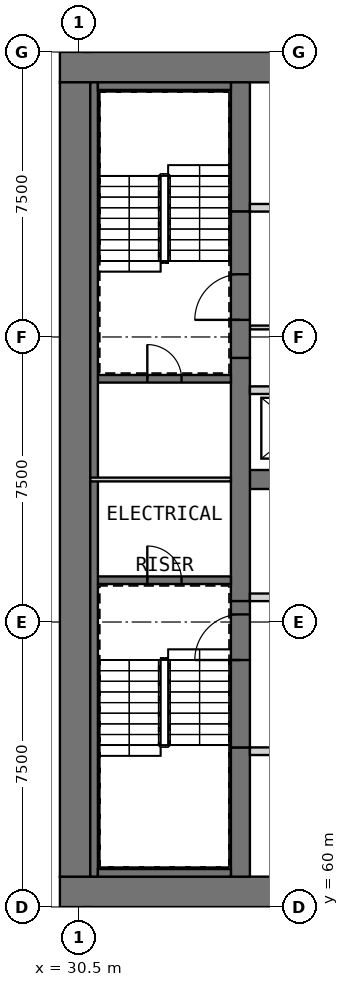
"""IFC4 building model, lengths in metres.
Left out: names, types, materials, properties, quantities, classifications, styles, units other than length and angle.
Written with IfcOpenShell. Run it as: python <this file> out.ifc"""

import sys

from ifc_helpers import new_model, si_unit, direction, frame, frame_2d, origin, place, context, subcontext, project, spatial, rectangle, extrude, element, fill, save


model = new_model("IFC4")
c1 = context("Model", 3, precision=1e-05, world=origin(), true_north=direction((0.0, 1.0)))
c2 = subcontext(c1, "Body", "Model", "MODEL_VIEW")
j1 = project(units=[si_unit("LENGTHUNIT", "METRE"), si_unit("PLANEANGLEUNIT", "RADIAN")], contexts=[c1])
p1 = place(None, origin())
s1 = spatial("IfcSite", under=j1, at=p1, CompositionType="ELEMENT")
p2 = place(p1, origin())
s2 = spatial("IfcBuilding", under=s1, at=p2, CompositionType="ELEMENT")
p3 = place(p2, frame((0.0, 0.0, 124.2)))
s3 = spatial("IfcBuildingStorey", under=s2, at=p3, CompositionType="ELEMENT", Elevation=124.2)
p4 = place(p3, frame((30.0, 60.4, 0.0), z_axis=(0.0, 0.0, 1.0), x_axis=(1.0, 0.0, 0.0)))
e1 = element("IfcWall", 1, at=p4, inside=s3, PredefinedType="SHEAR", context=c2, shape_type="SweptSolid", body=[
    extrude(rectangle(XDim=30.0, YDim=0.8, at=frame_2d((15.0, 0.0))), origin(), (0.0, 0.0, 1.0), 6.0),
])
p5 = place(p4, frame((21.9, 0.0, 0.0)))
e2 = element("IfcOpeningElement", 2, at=p5, cuts=e1, PredefinedType="OPENING", context=c2, shape_type="SweptSolid", body=[
    extrude(rectangle(XDim=1.8, YDim=2.1, at=frame_2d((0.9, 1.05))), frame((0.0, 0.41, 0.0), z_axis=(0.0, -1.0, 0.0), x_axis=(1.0, 0.0, 0.0)), (0.0, 0.0, 1.0), 0.82),
])
p6 = place(p4, frame((26.5, 0.0, 0.0)))
e3 = element("IfcOpeningElement", 3, at=p6, cuts=e1, PredefinedType="OPENING", context=c2, shape_type="SweptSolid", body=[
    extrude(rectangle(XDim=1.2, YDim=2.1, at=frame_2d((0.6, 1.05))), frame((0.0, 0.41, 0.0), z_axis=(0.0, -1.0, 0.0), x_axis=(1.0, 0.0, 0.0)), (0.0, 0.0, 1.0), 0.82),
])
p7 = place(p3, frame((30.0, 82.1, 0.0), z_axis=(0.0, 0.0, 1.0), x_axis=(1.0, 0.0, 0.0)))
e4 = element("IfcWall", 4, at=p7, inside=s3, PredefinedType="SHEAR", context=c2, shape_type="SweptSolid", body=[
    extrude(rectangle(XDim=30.0, YDim=0.8, at=frame_2d((15.0, 0.0))), origin(), (0.0, 0.0, 1.0), 6.0),
])
p8 = place(p3, frame((30.4, 60.8, 0.0), z_axis=(0.0, 0.0, 1.0), x_axis=(0.0, 1.0, 0.0)))
e5 = element("IfcWall", 5, at=p8, inside=s3, PredefinedType="SHEAR", context=c2, shape_type="SweptSolid", body=[
    extrude(rectangle(XDim=20.9, YDim=0.8, at=frame_2d((10.45, 0.0))), origin(), (0.0, 0.0, 1.0), 6.0),
])
p9 = place(p3, frame((35.0, 71.25, 0.0), z_axis=(0.0, 0.0, 1.0), x_axis=(1.0, 0.0, 0.0)))
e6 = element("IfcWall", 6, at=p9, inside=s3, PredefinedType="SHEAR", context=c2, shape_type="SweptSolid", body=[
    extrude(rectangle(XDim=15.6, YDim=0.5, at=frame_2d((7.8, 0.0))), origin(), (0.0, 0.0, 1.0), 6.0),
])
p10 = place(p3, frame((34.75, 60.8, 0.0), z_axis=(0.0, 0.0, 1.0), x_axis=(0.0, 1.0, 0.0)))
e7 = element("IfcWall", 7, at=p10, inside=s3, PredefinedType="SHEAR", context=c2, shape_type="SweptSolid", body=[
    extrude(rectangle(XDim=3.4, YDim=0.5, at=frame_2d((1.7, 0.0))), origin(), (0.0, 0.0, 1.0), 6.0),
])
p11 = place(p3, frame((34.75, 68.05, 0.0), z_axis=(0.0, 0.0, 1.0), x_axis=(0.0, 1.0, 0.0)))
e8 = element("IfcWall", 8, at=p11, inside=s3, PredefinedType="SHEAR", context=c2, shape_type="SweptSolid", body=[
    extrude(rectangle(XDim=6.4, YDim=0.5, at=frame_2d((3.2, 0.0))), origin(), (0.0, 0.0, 1.0), 6.0),
])
p12 = place(p3, frame((34.75, 78.3, 0.0), z_axis=(0.0, 0.0, 1.0), x_axis=(0.0, 1.0, 0.0)))
e9 = element("IfcWall", 9, at=p12, inside=s3, PredefinedType="SHEAR", context=c2, shape_type="SweptSolid", body=[
    extrude(rectangle(XDim=3.4, YDim=0.5, at=frame_2d((1.7, 0.0))), origin(), (0.0, 0.0, 1.0), 6.0),
])
p13 = place(p2, frame((0.0, 0.0, 34.0)))
s4 = spatial("IfcBuildingStorey", under=s2, at=p13, CompositionType="ELEMENT", Elevation=34.0)
for number, where, z_axis, x_axis in (
    (10, (29.7, 61.05, 0.0), (0.0, 0.0, 1.0), (0.0, 1.0, 0.0)),
    (11, (29.7, 65.925, 0.0), (0.0, 0.0, 1.0), (0.0, 1.0, 0.0)),
    (12, (29.7, 70.8, 0.0), (0.0, 0.0, 1.0), (0.0, 1.0, 0.0)),
    (13, (29.7, 75.675, 0.0), (0.0, 0.0, 1.0), (0.0, 1.0, 0.0)),
    (14, (29.7, 80.55, 0.0), (0.0, 0.0, 1.0), (0.0, 1.0, 0.0)),
):
    element("IfcWall", number, at=place(p13, frame(where, z_axis=z_axis, x_axis=x_axis)), inside=s4, PredefinedType="SOLIDWALL", context=c2, shape_type="SweptSolid", body=[
        extrude(rectangle(XDim=0.9, YDim=0.6, at=frame_2d((0.45, 0.0))), origin(), (0.0, 0.0, 1.0), 286.2),
    ])
p14 = place(p3, frame((35.0, 64.1, 0.0), z_axis=(0.0, 0.0, 1.0), x_axis=(1.0, 0.0, 0.0)))
e15 = element("IfcWall", 15, at=p14, inside=s3, PredefinedType="SOLIDWALL", context=c2, shape_type="SweptSolid", body=[
    extrude(rectangle(XDim=13.0, YDim=0.2, at=frame_2d((6.5, 0.0))), origin(), (0.0, 0.0, 1.0), 6.0),
])
p15 = place(p14, frame((0.75, 0.0, 0.0)))
e16 = element("IfcOpeningElement", 16, at=p15, cuts=e15, PredefinedType="OPENING", context=c2, shape_type="SweptSolid", body=[
    extrude(rectangle(XDim=1.1, YDim=2.1, at=frame_2d((0.55, 1.05))), frame((0.0, 0.11, 0.0), z_axis=(0.0, -1.0, 0.0), x_axis=(1.0, 0.0, 0.0)), (0.0, 0.0, 1.0), 0.22),
])
p16 = place(p14, frame((3.35, 0.0, 0.0)))
e17 = element("IfcOpeningElement", 17, at=p16, cuts=e15, PredefinedType="OPENING", context=c2, shape_type="SweptSolid", body=[
    extrude(rectangle(XDim=1.1, YDim=2.1, at=frame_2d((0.55, 1.05))), frame((0.0, 0.11, 0.0), z_axis=(0.0, -1.0, 0.0), x_axis=(1.0, 0.0, 0.0)), (0.0, 0.0, 1.0), 0.22),
])
p17 = place(p14, frame((5.95, 0.0, 0.0)))
e18 = element("IfcOpeningElement", 18, at=p17, cuts=e15, PredefinedType="OPENING", context=c2, shape_type="SweptSolid", body=[
    extrude(rectangle(XDim=1.1, YDim=2.1, at=frame_2d((0.55, 1.05))), frame((0.0, 0.11, 0.0), z_axis=(0.0, -1.0, 0.0), x_axis=(1.0, 0.0, 0.0)), (0.0, 0.0, 1.0), 0.22),
])
p18 = place(p14, frame((8.55, 0.0, 0.0)))
e19 = element("IfcOpeningElement", 19, at=p18, cuts=e15, PredefinedType="OPENING", context=c2, shape_type="SweptSolid", body=[
    extrude(rectangle(XDim=1.1, YDim=2.1, at=frame_2d((0.55, 1.05))), frame((0.0, 0.11, 0.0), z_axis=(0.0, -1.0, 0.0), x_axis=(1.0, 0.0, 0.0)), (0.0, 0.0, 1.0), 0.22),
])
p19 = place(p14, frame((11.15, 0.0, 0.0)))
e20 = element("IfcOpeningElement", 20, at=p19, cuts=e15, PredefinedType="OPENING", context=c2, shape_type="SweptSolid", body=[
    extrude(rectangle(XDim=1.1, YDim=2.1, at=frame_2d((0.55, 1.05))), frame((0.0, 0.11, 0.0), z_axis=(0.0, -1.0, 0.0), x_axis=(1.0, 0.0, 0.0)), (0.0, 0.0, 1.0), 0.22),
])
p20 = place(p3, frame((35.0, 68.15, 0.0), z_axis=(0.0, 0.0, 1.0), x_axis=(1.0, 0.0, 0.0)))
e21 = element("IfcWall", 21, at=p20, inside=s3, PredefinedType="SOLIDWALL", context=c2, shape_type="SweptSolid", body=[
    extrude(rectangle(XDim=13.0, YDim=0.2, at=frame_2d((6.5, 0.0))), origin(), (0.0, 0.0, 1.0), 6.0),
])
p21 = place(p20, frame((0.75, 0.0, 0.0)))
e22 = element("IfcOpeningElement", 22, at=p21, cuts=e21, PredefinedType="OPENING", context=c2, shape_type="SweptSolid", body=[
    extrude(rectangle(XDim=1.1, YDim=2.1, at=frame_2d((0.55, 1.05))), frame((0.0, 0.11, 0.0), z_axis=(0.0, -1.0, 0.0), x_axis=(1.0, 0.0, 0.0)), (0.0, 0.0, 1.0), 0.22),
])
p22 = place(p20, frame((3.35, 0.0, 0.0)))
e23 = element("IfcOpeningElement", 23, at=p22, cuts=e21, PredefinedType="OPENING", context=c2, shape_type="SweptSolid", body=[
    extrude(rectangle(XDim=1.1, YDim=2.1, at=frame_2d((0.55, 1.05))), frame((0.0, 0.11, 0.0), z_axis=(0.0, -1.0, 0.0), x_axis=(1.0, 0.0, 0.0)), (0.0, 0.0, 1.0), 0.22),
])
p23 = place(p20, frame((5.95, 0.0, 0.0)))
e24 = element("IfcOpeningElement", 24, at=p23, cuts=e21, PredefinedType="OPENING", context=c2, shape_type="SweptSolid", body=[
    extrude(rectangle(XDim=1.1, YDim=2.1, at=frame_2d((0.55, 1.05))), frame((0.0, 0.11, 0.0), z_axis=(0.0, -1.0, 0.0), x_axis=(1.0, 0.0, 0.0)), (0.0, 0.0, 1.0), 0.22),
])
p24 = place(p20, frame((8.55, 0.0, 0.0)))
e25 = element("IfcOpeningElement", 25, at=p24, cuts=e21, PredefinedType="OPENING", context=c2, shape_type="SweptSolid", body=[
    extrude(rectangle(XDim=1.1, YDim=2.1, at=frame_2d((0.55, 1.05))), frame((0.0, 0.11, 0.0), z_axis=(0.0, -1.0, 0.0), x_axis=(1.0, 0.0, 0.0)), (0.0, 0.0, 1.0), 0.22),
])
p25 = place(p20, frame((11.15, 0.0, 0.0)))
e26 = element("IfcOpeningElement", 26, at=p25, cuts=e21, PredefinedType="OPENING", context=c2, shape_type="SweptSolid", body=[
    extrude(rectangle(XDim=1.1, YDim=2.1, at=frame_2d((0.55, 1.05))), frame((0.0, 0.11, 0.0), z_axis=(0.0, -1.0, 0.0), x_axis=(1.0, 0.0, 0.0)), (0.0, 0.0, 1.0), 0.22),
])
p26 = place(p3, frame((35.0, 73.6, 0.0), z_axis=(0.0, 0.0, 1.0), x_axis=(1.0, 0.0, 0.0)))
e27 = element("IfcWall", 27, at=p26, inside=s3, PredefinedType="SOLIDWALL", context=c2, shape_type="SweptSolid", body=[
    extrude(rectangle(XDim=15.6, YDim=0.2, at=frame_2d((7.8, 0.0))), origin(), (0.0, 0.0, 1.0), 6.0),
])
p27 = place(p26, frame((0.75, 0.0, 0.0)))
e28 = element("IfcOpeningElement", 28, at=p27, cuts=e27, PredefinedType="OPENING", context=c2, shape_type="SweptSolid", body=[
    extrude(rectangle(XDim=1.1, YDim=2.1, at=frame_2d((0.55, 1.05))), frame((0.0, 0.11, 0.0), z_axis=(0.0, -1.0, 0.0), x_axis=(1.0, 0.0, 0.0)), (0.0, 0.0, 1.0), 0.22),
])
p28 = place(p26, frame((3.35, 0.0, 0.0)))
e29 = element("IfcOpeningElement", 29, at=p28, cuts=e27, PredefinedType="OPENING", context=c2, shape_type="SweptSolid", body=[
    extrude(rectangle(XDim=1.1, YDim=2.1, at=frame_2d((0.55, 1.05))), frame((0.0, 0.11, 0.0), z_axis=(0.0, -1.0, 0.0), x_axis=(1.0, 0.0, 0.0)), (0.0, 0.0, 1.0), 0.22),
])
p29 = place(p26, frame((5.95, 0.0, 0.0)))
e30 = element("IfcOpeningElement", 30, at=p29, cuts=e27, PredefinedType="OPENING", context=c2, shape_type="SweptSolid", body=[
    extrude(rectangle(XDim=1.1, YDim=2.1, at=frame_2d((0.55, 1.05))), frame((0.0, 0.11, 0.0), z_axis=(0.0, -1.0, 0.0), x_axis=(1.0, 0.0, 0.0)), (0.0, 0.0, 1.0), 0.22),
])
p30 = place(p26, frame((8.55, 0.0, 0.0)))
e31 = element("IfcOpeningElement", 31, at=p30, cuts=e27, PredefinedType="OPENING", context=c2, shape_type="SweptSolid", body=[
    extrude(rectangle(XDim=1.1, YDim=2.1, at=frame_2d((0.55, 1.05))), frame((0.0, 0.11, 0.0), z_axis=(0.0, -1.0, 0.0), x_axis=(1.0, 0.0, 0.0)), (0.0, 0.0, 1.0), 0.22),
])
p31 = place(p26, frame((11.15, 0.0, 0.0)))
e32 = element("IfcOpeningElement", 32, at=p31, cuts=e27, PredefinedType="OPENING", context=c2, shape_type="SweptSolid", body=[
    extrude(rectangle(XDim=1.1, YDim=2.1, at=frame_2d((0.55, 1.05))), frame((0.0, 0.11, 0.0), z_axis=(0.0, -1.0, 0.0), x_axis=(1.0, 0.0, 0.0)), (0.0, 0.0, 1.0), 0.22),
])
p32 = place(p26, frame((13.75, 0.0, 0.0)))
e33 = element("IfcOpeningElement", 33, at=p32, cuts=e27, PredefinedType="OPENING", context=c2, shape_type="SweptSolid", body=[
    extrude(rectangle(XDim=1.1, YDim=2.1, at=frame_2d((0.55, 1.05))), frame((0.0, 0.11, 0.0), z_axis=(0.0, -1.0, 0.0), x_axis=(1.0, 0.0, 0.0)), (0.0, 0.0, 1.0), 0.22),
])
p33 = place(p3, frame((35.0, 78.4, 0.0), z_axis=(0.0, 0.0, 1.0), x_axis=(1.0, 0.0, 0.0)))
e34 = element("IfcWall", 34, at=p33, inside=s3, PredefinedType="SOLIDWALL", context=c2, shape_type="SweptSolid", body=[
    extrude(rectangle(XDim=15.6, YDim=0.2, at=frame_2d((7.8, 0.0))), origin(), (0.0, 0.0, 1.0), 6.0),
])
p34 = place(p33, frame((0.75, 0.0, 0.0)))
e35 = element("IfcOpeningElement", 35, at=p34, cuts=e34, PredefinedType="OPENING", context=c2, shape_type="SweptSolid", body=[
    extrude(rectangle(XDim=1.1, YDim=2.1, at=frame_2d((0.55, 1.05))), frame((0.0, 0.11, 0.0), z_axis=(0.0, -1.0, 0.0), x_axis=(1.0, 0.0, 0.0)), (0.0, 0.0, 1.0), 0.22),
])
p35 = place(p33, frame((3.35, 0.0, 0.0)))
e36 = element("IfcOpeningElement", 36, at=p35, cuts=e34, PredefinedType="OPENING", context=c2, shape_type="SweptSolid", body=[
    extrude(rectangle(XDim=1.1, YDim=2.1, at=frame_2d((0.55, 1.05))), frame((0.0, 0.11, 0.0), z_axis=(0.0, -1.0, 0.0), x_axis=(1.0, 0.0, 0.0)), (0.0, 0.0, 1.0), 0.22),
])
p36 = place(p33, frame((11.15, 0.0, 0.0)))
e37 = element("IfcOpeningElement", 37, at=p36, cuts=e34, PredefinedType="OPENING", context=c2, shape_type="SweptSolid", body=[
    extrude(rectangle(XDim=1.1, YDim=2.1, at=frame_2d((0.55, 1.05))), frame((0.0, 0.11, 0.0), z_axis=(0.0, -1.0, 0.0), x_axis=(1.0, 0.0, 0.0)), (0.0, 0.0, 1.0), 0.22),
])
p37 = place(p33, frame((13.75, 0.0, 0.0)))
e38 = element("IfcOpeningElement", 38, at=p37, cuts=e34, PredefinedType="OPENING", context=c2, shape_type="SweptSolid", body=[
    extrude(rectangle(XDim=1.1, YDim=2.1, at=frame_2d((0.55, 1.05))), frame((0.0, 0.11, 0.0), z_axis=(0.0, -1.0, 0.0), x_axis=(1.0, 0.0, 0.0)), (0.0, 0.0, 1.0), 0.22),
])
p38 = place(p3, frame((35.0, 75.25, 0.0), z_axis=(0.0, 0.0, 1.0), x_axis=(1.0, 0.0, 0.0)))
e39 = element("IfcWall", 39, at=p38, inside=s3, PredefinedType="PARTITIONING", context=c2, shape_type="SweptSolid", body=[
    extrude(rectangle(XDim=5.25, YDim=0.1, at=frame_2d((2.625, 0.0))), origin(), (0.0, 0.0, 1.0), 5.75),
])
p39 = place(p3, frame((34.75, 64.2, 0.0), z_axis=(0.0, 0.0, 1.0), x_axis=(0.0, 1.0, 0.0)))
e40 = element("IfcWall", 40, at=p39, inside=s3, PredefinedType="SOLIDWALL", context=c2, shape_type="SweptSolid", body=[
    extrude(rectangle(XDim=3.85, YDim=0.5, at=frame_2d((1.925, 0.0))), origin(), (0.0, 0.0, 1.0), 4.8),
])
p40 = place(p39, frame((2.3, 0.0, 0.0)))
e41 = element("IfcOpeningElement", 41, at=p40, cuts=e40, PredefinedType="OPENING", context=c2, shape_type="SweptSolid", body=[
    extrude(rectangle(XDim=1.2, YDim=2.1, at=frame_2d((0.6, 1.05))), frame((0.0, 0.26, 0.0), z_axis=(0.0, -1.0, 0.0), x_axis=(1.0, 0.0, 0.0)), (0.0, 0.0, 1.0), 0.52),
])
p41 = place(p3, frame((34.75, 74.45, 0.0), z_axis=(0.0, 0.0, 1.0), x_axis=(0.0, 1.0, 0.0)))
e42 = element("IfcWall", 42, at=p41, inside=s3, PredefinedType="SOLIDWALL", context=c2, shape_type="SweptSolid", body=[
    extrude(rectangle(XDim=3.85, YDim=0.5, at=frame_2d((1.925, 0.0))), origin(), (0.0, 0.0, 1.0), 4.8),
])
p42 = place(p41, frame((1.0, 0.0, 0.0)))
e43 = element("IfcOpeningElement", 43, at=p42, cuts=e42, PredefinedType="OPENING", context=c2, shape_type="SweptSolid", body=[
    extrude(rectangle(XDim=1.2, YDim=2.1, at=frame_2d((0.6, 1.05))), frame((0.0, 0.26, 0.0), z_axis=(0.0, -1.0, 0.0), x_axis=(1.0, 0.0, 0.0)), (0.0, 0.0, 1.0), 0.52),
])
p43 = place(p3, frame((30.8, 68.6, 0.0), z_axis=(0.0, 0.0, 1.0), x_axis=(1.0, 0.0, 0.0)))
e44 = element("IfcWall", 44, at=p43, inside=s3, PredefinedType="SOLIDWALL", context=c2, shape_type="SweptSolid", body=[
    extrude(rectangle(XDim=3.7, YDim=0.2, at=frame_2d((1.85, 0.0))), origin(), (0.0, 0.0, 1.0), 5.75),
])
p44 = place(p43, frame((1.5, 0.0, 0.0)))
e45 = element("IfcOpeningElement", 45, at=p44, cuts=e44, PredefinedType="OPENING", context=c2, shape_type="SweptSolid", body=[
    extrude(rectangle(XDim=0.9, YDim=2.1, at=frame_2d((0.45, 1.05))), frame((0.0, 0.11, 0.0), z_axis=(0.0, -1.0, 0.0), x_axis=(1.0, 0.0, 0.0)), (0.0, 0.0, 1.0), 0.22),
])
p45 = place(p3, frame((30.8, 73.9, 0.0), z_axis=(0.0, 0.0, 1.0), x_axis=(1.0, 0.0, 0.0)))
e46 = element("IfcWall", 46, at=p45, inside=s3, PredefinedType="SOLIDWALL", context=c2, shape_type="SweptSolid", body=[
    extrude(rectangle(XDim=3.7, YDim=0.2, at=frame_2d((1.85, 0.0))), origin(), (0.0, 0.0, 1.0), 5.75),
])
p46 = place(p45, frame((1.5, 0.0, 0.0)))
e47 = element("IfcOpeningElement", 47, at=p46, cuts=e46, PredefinedType="OPENING", context=c2, shape_type="SweptSolid", body=[
    extrude(rectangle(XDim=0.9, YDim=2.1, at=frame_2d((0.45, 1.05))), frame((0.0, 0.11, 0.0), z_axis=(0.0, -1.0, 0.0), x_axis=(1.0, 0.0, 0.0)), (0.0, 0.0, 1.0), 0.22),
])
p47 = place(p3, frame((30.9, 60.8, 0.0), z_axis=(0.0, 0.0, 1.0), x_axis=(0.0, 1.0, 0.0)))
e48 = element("IfcWall", 48, at=p47, inside=s3, PredefinedType="SOLIDWALL", context=c2, shape_type="SweptSolid", body=[
    extrude(rectangle(XDim=20.9, YDim=0.2, at=frame_2d((10.45, 0.0))), origin(), (0.0, 0.0, 1.0), 5.75),
])
for number, where, z_axis, x_axis in (
    (49, (31.0, 60.9, 0.0), (0.0, 0.0, 1.0), (1.0, 0.0, 0.0)),
    (50, (31.0, 81.6, 0.0), (0.0, 0.0, 1.0), (1.0, 0.0, 0.0)),
):
    element("IfcWall", number, at=place(p3, frame(where, z_axis=z_axis, x_axis=x_axis)), inside=s3, PredefinedType="SOLIDWALL", context=c2, shape_type="SweptSolid", body=[
        extrude(rectangle(XDim=3.5, YDim=0.2, at=frame_2d((1.75, 0.0))), origin(), (0.0, 0.0, 1.0), 5.75),
    ])
p48 = place(p3, frame((30.8, 71.25, 0.0), z_axis=(0.0, 0.0, 1.0), x_axis=(1.0, 0.0, 0.0)))
e51 = element("IfcWall", 51, at=p48, inside=s3, PredefinedType="PARTITIONING", context=c2, shape_type="SweptSolid", body=[
    extrude(rectangle(XDim=3.7, YDim=0.1, at=frame_2d((1.85, 0.0))), origin(), (0.0, 0.0, 1.0), 5.75),
])
p49 = place(p40, origin())
e52 = element("IfcDoor", 52, at=p49, inside=s3, OperationType="SINGLE_SWING_LEFT", PredefinedType="DOOR", context=c2, shape_type="SweptSolid", body=[
    extrude(rectangle(XDim=1.2, YDim=2.1, at=frame_2d((0.6, 1.05))), frame((0.0, 0.025, 0.0), z_axis=(0.0, -1.0, 0.0), x_axis=(1.0, 0.0, 0.0)), (0.0, 0.0, 1.0), 0.05),
])
fill(e41, e52)
p50 = place(p42, origin())
e53 = element("IfcDoor", 53, at=p50, inside=s3, OperationType="SINGLE_SWING_RIGHT", PredefinedType="DOOR", context=c2, shape_type="SweptSolid", body=[
    extrude(rectangle(XDim=1.2, YDim=2.1, at=frame_2d((0.6, 1.05))), frame((0.0, 0.025, 0.0), z_axis=(0.0, -1.0, 0.0), x_axis=(1.0, 0.0, 0.0)), (0.0, 0.0, 1.0), 0.05),
])
fill(e43, e53)
p51 = place(p44, origin())
e54 = element("IfcDoor", 54, at=p51, inside=s3, OperationType="SINGLE_SWING_LEFT", PredefinedType="DOOR", context=c2, shape_type="SweptSolid", body=[
    extrude(rectangle(XDim=0.9, YDim=2.1, at=frame_2d((0.45, 1.05))), frame((0.0, 0.025, 0.0), z_axis=(0.0, -1.0, 0.0), x_axis=(1.0, 0.0, 0.0)), (0.0, 0.0, 1.0), 0.05),
])
fill(e45, e54)
p52 = place(p46, origin())
e55 = element("IfcDoor", 55, at=p52, inside=s3, OperationType="SINGLE_SWING_RIGHT", PredefinedType="DOOR", context=c2, shape_type="SweptSolid", body=[
    extrude(rectangle(XDim=0.9, YDim=2.1, at=frame_2d((0.45, 1.05))), frame((0.0, 0.025, 0.0), z_axis=(0.0, -1.0, 0.0), x_axis=(1.0, 0.0, 0.0)), (0.0, 0.0, 1.0), 0.05),
])
fill(e47, e55)
save(model, sys.argv[1])
